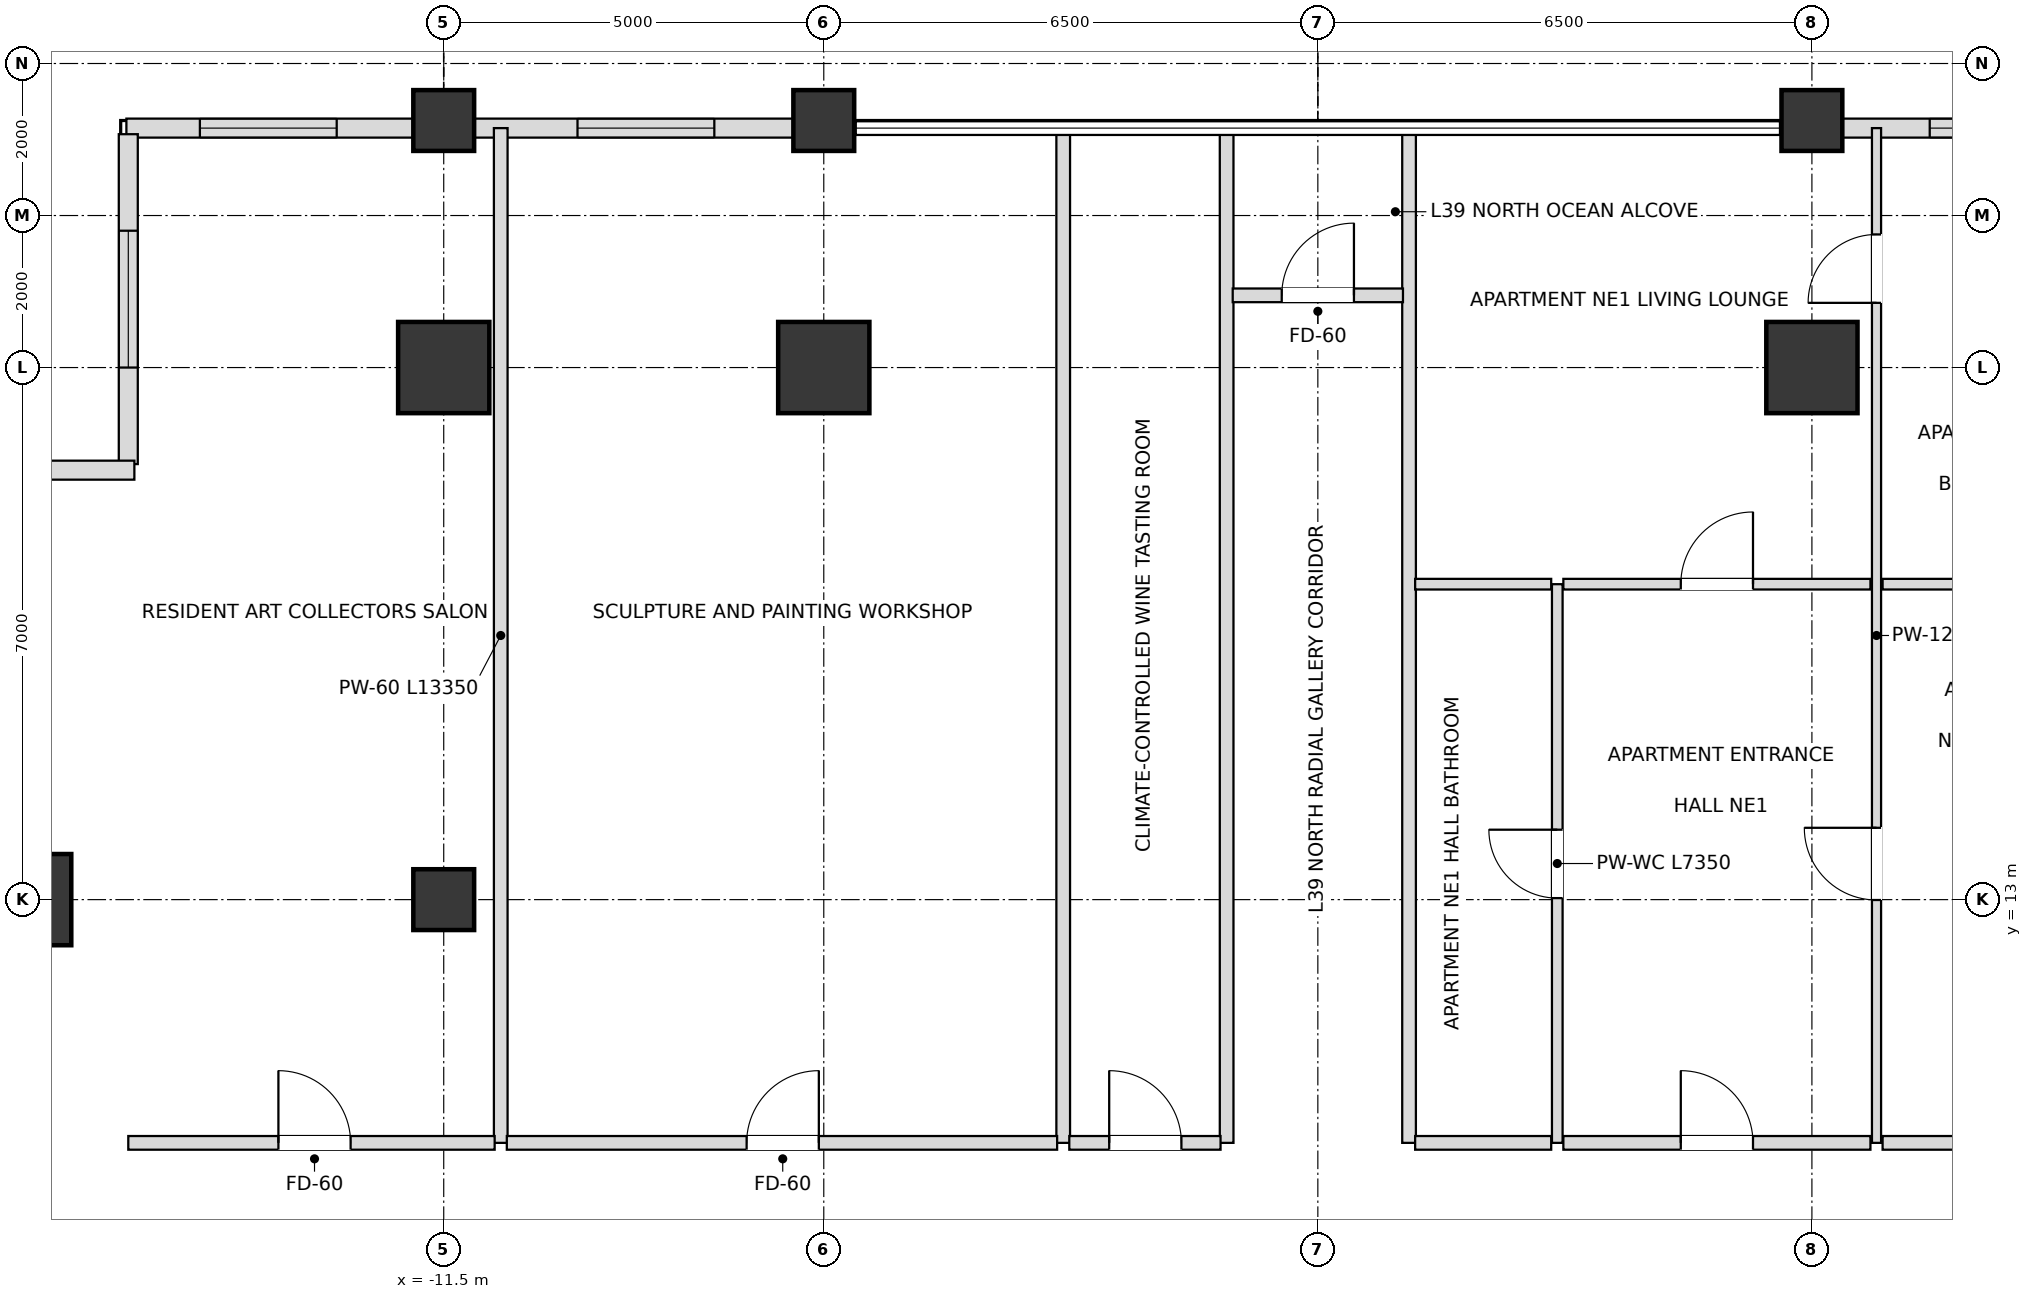
"""IFC4 building model, lengths in metres.
Left out: names, types, materials, properties, quantities, classifications, styles, units other than length and angle.
Written with IfcOpenShell. Run it as: python <this file> out.ifc"""

import sys

from ifc_helpers import new_model, si_unit, direction, frame, frame_2d, origin, origin_2d, place, context, subcontext, project, spatial, rectangle, extrude, element, fill, save


model = new_model("IFC4")
c1 = context("Model", 3, precision=1e-05, world=origin(), true_north=direction((0.0, 1.0)))
c2 = subcontext(c1, "Body", "Model", "MODEL_VIEW")
j1 = project(units=[si_unit("LENGTHUNIT", "METRE"), si_unit("PLANEANGLEUNIT", "RADIAN")], contexts=[c1])
p1 = place(None, origin())
s1 = spatial("IfcSite", under=j1, at=p1, CompositionType="ELEMENT")
p2 = place(p1, origin())
s2 = spatial("IfcBuilding", under=s1, at=p2, CompositionType="ELEMENT")
p3 = place(p2, frame((0.0, 0.0, 154.8)))
s3 = spatial("IfcBuildingStorey", under=s2, at=p3, CompositionType="ELEMENT", Elevation=154.8)
for number, where, z_axis, x_axis in (
    (1, (6.5, 20.0, 0.0), (0.0, 0.0, 1.0), (1.0, 0.0, 0.0)),
    (2, (-6.5, 20.0, 0.0), (0.0, 0.0, 1.0), (1.0, 0.0, 0.0)),
    (3, (-11.5, 20.0, 0.0), (0.0, 0.0, 1.0), (1.0, 0.0, 0.0)),
    (4, (-17.0, 13.0, 0.0), (0.0, 0.0, 1.0), (1.0, 0.0, 0.0)),
):
    element("IfcColumn", number, at=place(p3, frame(where, z_axis=z_axis, x_axis=x_axis)), inside=s3, PredefinedType="USERDEFINED", context=c2, shape_type="SweptSolid", body=[
        extrude(rectangle(XDim=1.2, YDim=1.2, at=origin_2d()), origin(), (0.0, 0.0, 1.0), 3.6),
    ])
for number, where, z_axis, x_axis in (
    (5, (-11.5, 13.0, 0.0), (0.0, 0.0, 1.0), (1.0, 0.0, 0.0)),
    (6, (-11.5, 23.25, 0.0), (0.0, 0.0, 1.0), (1.0, 0.0, 0.0)),
    (7, (-6.5, 23.25, 0.0), (0.0, 0.0, 1.0), (1.0, 0.0, 0.0)),
    (8, (6.5, 23.25, 0.0), (0.0, 0.0, 1.0), (1.0, 0.0, 0.0)),
):
    element("IfcColumn", number, at=place(p3, frame(where, z_axis=z_axis, x_axis=x_axis)), inside=s3, PredefinedType="COLUMN", context=c2, shape_type="SweptSolid", body=[
        extrude(rectangle(XDim=0.8, YDim=0.8, at=origin_2d()), origin(), (0.0, 0.0, 1.0), 3.6),
    ])
p4 = place(p3, frame((11.105, 23.15, 0.0), z_axis=(0.0, 0.0, 1.0), x_axis=(-1.0, 0.0, 0.0)))
e9 = element("IfcWall", 9, at=p4, inside=s3, PredefinedType="SOLIDWALL", context=c2, shape_type="SweptSolid", body=[
    extrude(rectangle(XDim=4.21, YDim=0.25, at=frame_2d((2.105, 0.0))), origin(), (0.0, 0.0, 1.0), 2.736),
])
p5 = place(p4, frame((1.255, 0.0, 0.72)))
e10 = element("IfcOpeningElement", 10, at=p5, cuts=e9, PredefinedType="OPENING", context=c2, shape_type="SweptSolid", body=[
    extrude(rectangle(XDim=1.8, YDim=1.68, at=frame_2d((0.9, 0.84))), frame((0.0, 0.135, 0.0), z_axis=(0.0, -1.0, 0.0), x_axis=(1.0, 0.0, 0.0)), (0.0, 0.0, 1.0), 0.27),
])
p6 = place(p3, frame((-6.895, 23.15, 0.0), z_axis=(0.0, 0.0, 1.0), x_axis=(-1.0, 0.0, 0.0)))
e11 = element("IfcWall", 11, at=p6, inside=s3, PredefinedType="SOLIDWALL", context=c2, shape_type="SweptSolid", body=[
    extrude(rectangle(XDim=4.21, YDim=0.25, at=frame_2d((2.105, 0.0))), origin(), (0.0, 0.0, 1.0), 2.736),
])
p7 = place(p6, frame((1.045, 0.0, 0.72)))
e12 = element("IfcOpeningElement", 12, at=p7, cuts=e11, PredefinedType="OPENING", context=c2, shape_type="SweptSolid", body=[
    extrude(rectangle(XDim=1.8, YDim=1.68, at=frame_2d((0.9, 0.84))), frame((0.0, 0.135, 0.0), z_axis=(0.0, -1.0, 0.0), x_axis=(1.0, 0.0, 0.0)), (0.0, 0.0, 1.0), 0.27),
])
p8 = place(p3, frame((-11.895, 23.15, 0.0), z_axis=(0.0, 0.0, 1.0), x_axis=(-1.0, 0.0, 0.0)))
e13 = element("IfcWall", 13, at=p8, inside=s3, PredefinedType="SOLIDWALL", context=c2, shape_type="SweptSolid", body=[
    extrude(rectangle(XDim=3.78, YDim=0.25, at=frame_2d((1.89, 0.0))), origin(), (0.0, 0.0, 1.0), 2.736),
])
p9 = place(p8, frame((1.013, 0.0, 0.72)))
e14 = element("IfcOpeningElement", 14, at=p9, cuts=e13, PredefinedType="OPENING", context=c2, shape_type="SweptSolid", body=[
    extrude(rectangle(XDim=1.8, YDim=1.68, at=frame_2d((0.9, 0.84))), frame((0.0, 0.135, 0.0), z_axis=(0.0, -1.0, 0.0), x_axis=(1.0, 0.0, 0.0)), (0.0, 0.0, 1.0), 0.27),
])
p10 = place(p3, frame((-15.65, 23.07, 0.0), z_axis=(0.0, 0.0, 1.0), x_axis=(0.0, -1.0, 0.0)))
e15 = element("IfcWall", 15, at=p10, inside=s3, PredefinedType="SOLIDWALL", context=c2, shape_type="SweptSolid", body=[
    extrude(rectangle(XDim=4.34, YDim=0.25, at=frame_2d((2.17, 0.0))), origin(), (0.0, 0.0, 1.0), 2.736),
])
p11 = place(p10, frame((1.27, 0.0, 0.72)))
e16 = element("IfcOpeningElement", 16, at=p11, cuts=e15, PredefinedType="OPENING", context=c2, shape_type="SweptSolid", body=[
    extrude(rectangle(XDim=1.8, YDim=1.68, at=frame_2d((0.9, 0.84))), frame((0.0, 0.135, 0.0), z_axis=(0.0, -1.0, 0.0), x_axis=(1.0, 0.0, 0.0)), (0.0, 0.0, 1.0), 0.27),
])
p12 = place(p3, frame((-15.57, 18.65, 0.0), z_axis=(0.0, 0.0, 1.0), x_axis=(-1.0, 0.0, 0.0)))
e17 = element("IfcWall", 17, at=p12, inside=s3, PredefinedType="SOLIDWALL", context=c2, shape_type="SweptSolid", body=[
    extrude(rectangle(XDim=4.66, YDim=0.25, at=frame_2d((2.33, 0.0))), origin(), (0.0, 0.0, 1.0), 2.736),
])
p13 = place(p12, frame((1.43, 0.0, 0.72)))
e18 = element("IfcOpeningElement", 18, at=p13, cuts=e17, PredefinedType="OPENING", context=c2, shape_type="SweptSolid", body=[
    extrude(rectangle(XDim=1.8, YDim=1.68, at=frame_2d((0.9, 0.84))), frame((0.0, 0.135, 0.0), z_axis=(0.0, -1.0, 0.0), x_axis=(1.0, 0.0, 0.0)), (0.0, 0.0, 1.0), 0.27),
])
for number, where, z_axis, x_axis in (
    (19, (-10.75, 9.8, 0.0), (0.0, 0.0, 1.0), (0.0, 1.0, 0.0)),
    (20, (-3.35, 9.8, 0.0), (0.0, 0.0, 1.0), (0.0, 1.0, 0.0)),
    (21, (-1.2, 9.8, 0.0), (0.0, 0.0, 1.0), (0.0, 1.0, 0.0)),
    (22, (1.2, 9.8, 0.0), (0.0, 0.0, 1.0), (0.0, 1.0, 0.0)),
):
    element("IfcWall", number, at=place(p3, frame(where, z_axis=z_axis, x_axis=x_axis)), inside=s3, PredefinedType="PARTITIONING", context=c2, shape_type="SweptSolid", body=[
        extrude(rectangle(XDim=13.35, YDim=0.18, at=frame_2d((6.675, 0.0))), origin(), (0.0, 0.0, 1.0), 2.816),
    ])
p14 = place(p3, frame((3.15, 9.8, 0.0), z_axis=(0.0, 0.0, 1.0), x_axis=(0.0, 1.0, 0.0)))
e23 = element("IfcWall", 23, at=p14, inside=s3, PredefinedType="PARTITIONING", context=c2, shape_type="SweptSolid", body=[
    extrude(rectangle(XDim=7.35, YDim=0.14, at=frame_2d((3.675, 0.0))), origin(), (0.0, 0.0, 1.0), 3.38),
])
p15 = place(p14, frame((3.22, 0.0, 0.0)))
e24 = element("IfcOpeningElement", 24, at=p15, cuts=e23, PredefinedType="OPENING", context=c2, shape_type="SweptSolid", body=[
    extrude(rectangle(XDim=0.9, YDim=2.1, at=frame_2d((0.45, 1.05))), frame((0.0, 0.08, 0.0), z_axis=(0.0, -1.0, 0.0), x_axis=(1.0, 0.0, 0.0)), (0.0, 0.0, 1.0), 0.16),
])
p16 = place(p3, frame((7.35, 9.8, 0.0), z_axis=(0.0, 0.0, 1.0), x_axis=(0.0, 1.0, 0.0)))
e25 = element("IfcWall", 25, at=p16, inside=s3, PredefinedType="PARTITIONING", context=c2, shape_type="SweptSolid", body=[
    extrude(rectangle(XDim=13.35, YDim=0.12, at=frame_2d((6.675, 0.0))), origin(), (0.0, 0.0, 1.0), 2.816),
])
p17 = place(p16, frame((3.195, 0.0, 0.0)))
e26 = element("IfcOpeningElement", 26, at=p17, cuts=e25, PredefinedType="OPENING", context=c2, shape_type="SweptSolid", body=[
    extrude(rectangle(XDim=0.95, YDim=2.1, at=frame_2d((0.475, 1.05))), frame((0.0, 0.07, 0.0), z_axis=(0.0, -1.0, 0.0), x_axis=(1.0, 0.0, 0.0)), (0.0, 0.0, 1.0), 0.14),
])
p18 = place(p16, frame((11.051, 0.0, 0.0)))
e27 = element("IfcOpeningElement", 27, at=p18, cuts=e25, PredefinedType="OPENING", context=c2, shape_type="SweptSolid", body=[
    extrude(rectangle(XDim=0.9, YDim=2.1, at=frame_2d((0.45, 1.05))), frame((0.0, 0.07, 0.0), z_axis=(0.0, -1.0, 0.0), x_axis=(1.0, 0.0, 0.0)), (0.0, 0.0, 1.0), 0.14),
])
p19 = place(p3, frame((-15.65, 9.8, 0.0), z_axis=(0.0, 0.0, 1.0), x_axis=(1.0, 0.0, 0.0)))
e28 = element("IfcWall", 28, at=p19, inside=s3, PredefinedType="PARTITIONING", context=c2, shape_type="SweptSolid", body=[
    extrude(rectangle(XDim=4.82, YDim=0.18, at=frame_2d((2.41, 0.0))), origin(), (0.0, 0.0, 1.0), 3.38),
])
p20 = place(p19, frame((1.975, 0.0, 0.0)))
e29 = element("IfcOpeningElement", 29, at=p20, cuts=e28, PredefinedType="OPENING", context=c2, shape_type="SweptSolid", body=[
    extrude(rectangle(XDim=0.95, YDim=2.15, at=frame_2d((0.475, 1.075))), frame((0.0, 0.1, 0.0), z_axis=(0.0, -1.0, 0.0), x_axis=(1.0, 0.0, 0.0)), (0.0, 0.0, 1.0), 0.2),
])
p21 = place(p3, frame((-10.67, 9.8, 0.0), z_axis=(0.0, 0.0, 1.0), x_axis=(1.0, 0.0, 0.0)))
e30 = element("IfcWall", 30, at=p21, inside=s3, PredefinedType="PARTITIONING", context=c2, shape_type="SweptSolid", body=[
    extrude(rectangle(XDim=7.24, YDim=0.18, at=frame_2d((3.62, 0.0))), origin(), (0.0, 0.0, 1.0), 2.816),
])
p22 = place(p21, frame((3.155, 0.0, 0.0)))
e31 = element("IfcOpeningElement", 31, at=p22, cuts=e30, PredefinedType="OPENING", context=c2, shape_type="SweptSolid", body=[
    extrude(rectangle(XDim=0.95, YDim=2.15, at=frame_2d((0.475, 1.075))), frame((0.0, 0.1, 0.0), z_axis=(0.0, -1.0, 0.0), x_axis=(1.0, 0.0, 0.0)), (0.0, 0.0, 1.0), 0.2),
])
p23 = place(p3, frame((-3.27, 9.8, 0.0), z_axis=(0.0, 0.0, 1.0), x_axis=(1.0, 0.0, 0.0)))
e32 = element("IfcWall", 32, at=p23, inside=s3, PredefinedType="PARTITIONING", context=c2, shape_type="SweptSolid", body=[
    extrude(rectangle(XDim=1.99, YDim=0.18, at=frame_2d((0.995, 0.0))), origin(), (0.0, 0.0, 1.0), 3.38),
])
p24 = place(p23, frame((0.525, 0.0, 0.0)))
e33 = element("IfcOpeningElement", 33, at=p24, cuts=e32, PredefinedType="OPENING", context=c2, shape_type="SweptSolid", body=[
    extrude(rectangle(XDim=0.95, YDim=2.15, at=frame_2d((0.475, 1.075))), frame((0.0, 0.1, 0.0), z_axis=(0.0, -1.0, 0.0), x_axis=(1.0, 0.0, 0.0)), (0.0, 0.0, 1.0), 0.2),
])
p25 = place(p3, frame((1.28, 9.8, 0.0), z_axis=(0.0, 0.0, 1.0), x_axis=(1.0, 0.0, 0.0)))
e34 = element("IfcWall", 34, at=p25, inside=s3, PredefinedType="PARTITIONING", context=c2, shape_type="SweptSolid", body=[
    extrude(rectangle(XDim=1.79, YDim=0.18, at=frame_2d((0.895, 0.0))), origin(), (0.0, 0.0, 1.0), 3.38),
])
p26 = place(p3, frame((3.23, 9.8, 0.0), z_axis=(0.0, 0.0, 1.0), x_axis=(1.0, 0.0, 0.0)))
e35 = element("IfcWall", 35, at=p26, inside=s3, PredefinedType="PARTITIONING", context=c2, shape_type="SweptSolid", body=[
    extrude(rectangle(XDim=4.04, YDim=0.18, at=frame_2d((2.02, 0.0))), origin(), (0.0, 0.0, 1.0), 2.816),
])
p27 = place(p26, frame((1.545, 0.0, 0.0)))
e36 = element("IfcOpeningElement", 36, at=p27, cuts=e35, PredefinedType="OPENING", context=c2, shape_type="SweptSolid", body=[
    extrude(rectangle(XDim=0.95, YDim=2.15, at=frame_2d((0.475, 1.075))), frame((0.0, 0.1, 0.0), z_axis=(0.0, -1.0, 0.0), x_axis=(1.0, 0.0, 0.0)), (0.0, 0.0, 1.0), 0.2),
])
p28 = place(p3, frame((7.43, 9.8, 0.0), z_axis=(0.0, 0.0, 1.0), x_axis=(1.0, 0.0, 0.0)))
e37 = element("IfcWall", 37, at=p28, inside=s3, PredefinedType="PARTITIONING", context=c2, shape_type="SweptSolid", body=[
    extrude(rectangle(XDim=3.04, YDim=0.18, at=frame_2d((1.52, 0.0))), origin(), (0.0, 0.0, 1.0), 3.38),
])
p29 = place(p3, frame((1.28, 17.15, 0.0), z_axis=(0.0, 0.0, 1.0), x_axis=(1.0, 0.0, 0.0)))
e38 = element("IfcWall", 38, at=p29, inside=s3, PredefinedType="PARTITIONING", context=c2, shape_type="SweptSolid", body=[
    extrude(rectangle(XDim=1.79, YDim=0.14, at=frame_2d((0.895, 0.0))), origin(), (0.0, 0.0, 1.0), 3.38),
])
p30 = place(p3, frame((3.23, 17.15, 0.0), z_axis=(0.0, 0.0, 1.0), x_axis=(1.0, 0.0, 0.0)))
e39 = element("IfcWall", 39, at=p30, inside=s3, PredefinedType="PARTITIONING", context=c2, shape_type="SweptSolid", body=[
    extrude(rectangle(XDim=4.04, YDim=0.14, at=frame_2d((2.02, 0.0))), origin(), (0.0, 0.0, 1.0), 2.816),
])
p31 = place(p30, frame((1.545, 0.0, 0.0)))
e40 = element("IfcOpeningElement", 40, at=p31, cuts=e39, PredefinedType="OPENING", context=c2, shape_type="SweptSolid", body=[
    extrude(rectangle(XDim=0.95, YDim=2.1, at=frame_2d((0.475, 1.05))), frame((0.0, 0.08, 0.0), z_axis=(0.0, -1.0, 0.0), x_axis=(1.0, 0.0, 0.0)), (0.0, 0.0, 1.0), 0.16),
])
p32 = place(p3, frame((7.43, 17.15, 0.0), z_axis=(0.0, 0.0, 1.0), x_axis=(1.0, 0.0, 0.0)))
e41 = element("IfcWall", 41, at=p32, inside=s3, PredefinedType="PARTITIONING", context=c2, shape_type="SweptSolid", body=[
    extrude(rectangle(XDim=3.04, YDim=0.14, at=frame_2d((1.52, 0.0))), origin(), (0.0, 0.0, 1.0), 3.38),
])
p33 = place(p3, frame((-1.12, 20.95, 0.0), z_axis=(0.0, 0.0, 1.0), x_axis=(1.0, 0.0, 0.0)))
e42 = element("IfcWall", 42, at=p33, inside=s3, PredefinedType="PARTITIONING", context=c2, shape_type="SweptSolid", body=[
    extrude(rectangle(XDim=2.24, YDim=0.18, at=frame_2d((1.12, 0.0))), origin(), (0.0, 0.0, 1.0), 3.38),
])
p34 = place(p33, frame((0.645, 0.0, 0.0)))
e43 = element("IfcOpeningElement", 43, at=p34, cuts=e42, PredefinedType="OPENING", context=c2, shape_type="SweptSolid", body=[
    extrude(rectangle(XDim=0.95, YDim=2.15, at=frame_2d((0.475, 1.075))), frame((0.0, 0.1, 0.0), z_axis=(0.0, -1.0, 0.0), x_axis=(1.0, 0.0, 0.0)), (0.0, 0.0, 1.0), 0.2),
])
p35 = place(p5, origin())
e44 = element("IfcWindow", 44, at=p35, inside=s3, PartitioningType="SINGLE_PANEL", PredefinedType="WINDOW", context=c2, shape_type="SweptSolid", body=[
    extrude(rectangle(XDim=1.8, YDim=1.68, at=frame_2d((0.9, 0.84))), frame((0.0, 0.03, 0.0), z_axis=(0.0, -1.0, 0.0), x_axis=(1.0, 0.0, 0.0)), (0.0, 0.0, 1.0), 0.06),
])
fill(e10, e44)
p36 = place(p7, origin())
e45 = element("IfcWindow", 45, at=p36, inside=s3, PartitioningType="SINGLE_PANEL", PredefinedType="WINDOW", context=c2, shape_type="SweptSolid", body=[
    extrude(rectangle(XDim=1.8, YDim=1.68, at=frame_2d((0.9, 0.84))), frame((0.0, 0.03, 0.0), z_axis=(0.0, -1.0, 0.0), x_axis=(1.0, 0.0, 0.0)), (0.0, 0.0, 1.0), 0.06),
])
fill(e12, e45)
p37 = place(p9, origin())
e46 = element("IfcWindow", 46, at=p37, inside=s3, PartitioningType="SINGLE_PANEL", PredefinedType="WINDOW", context=c2, shape_type="SweptSolid", body=[
    extrude(rectangle(XDim=1.8, YDim=1.68, at=frame_2d((0.9, 0.84))), frame((0.0, 0.03, 0.0), z_axis=(0.0, -1.0, 0.0), x_axis=(1.0, 0.0, 0.0)), (0.0, 0.0, 1.0), 0.06),
])
fill(e14, e46)
p38 = place(p11, origin())
e47 = element("IfcWindow", 47, at=p38, inside=s3, PartitioningType="SINGLE_PANEL", PredefinedType="WINDOW", context=c2, shape_type="SweptSolid", body=[
    extrude(rectangle(XDim=1.8, YDim=1.68, at=frame_2d((0.9, 0.84))), frame((0.0, 0.03, 0.0), z_axis=(0.0, -1.0, 0.0), x_axis=(1.0, 0.0, 0.0)), (0.0, 0.0, 1.0), 0.06),
])
fill(e16, e47)
p39 = place(p34, origin())
e48 = element("IfcDoor", 48, at=p39, inside=s3, OperationType="SINGLE_SWING_RIGHT", PredefinedType="DOOR", context=c2, shape_type="SweptSolid", body=[
    extrude(rectangle(XDim=0.95, YDim=2.15, at=frame_2d((0.475, 1.075))), frame((0.0, 0.025, 0.0), z_axis=(0.0, -1.0, 0.0), x_axis=(1.0, 0.0, 0.0)), (0.0, 0.0, 1.0), 0.05),
])
fill(e43, e48)
p40 = place(p20, origin())
e49 = element("IfcDoor", 49, at=p40, inside=s3, OperationType="SINGLE_SWING_LEFT", PredefinedType="DOOR", context=c2, shape_type="SweptSolid", body=[
    extrude(rectangle(XDim=0.95, YDim=2.15, at=frame_2d((0.475, 1.075))), frame((0.0, 0.025, 0.0), z_axis=(0.0, -1.0, 0.0), x_axis=(1.0, 0.0, 0.0)), (0.0, 0.0, 1.0), 0.05),
])
fill(e29, e49)
p41 = place(p22, origin())
e50 = element("IfcDoor", 50, at=p41, inside=s3, OperationType="SINGLE_SWING_RIGHT", PredefinedType="DOOR", context=c2, shape_type="SweptSolid", body=[
    extrude(rectangle(XDim=0.95, YDim=2.15, at=frame_2d((0.475, 1.075))), frame((0.0, 0.025, 0.0), z_axis=(0.0, -1.0, 0.0), x_axis=(1.0, 0.0, 0.0)), (0.0, 0.0, 1.0), 0.05),
])
fill(e31, e50)
p42 = place(p24, origin())
e51 = element("IfcDoor", 51, at=p42, inside=s3, OperationType="SINGLE_SWING_LEFT", PredefinedType="DOOR", context=c2, shape_type="SweptSolid", body=[
    extrude(rectangle(XDim=0.95, YDim=2.15, at=frame_2d((0.475, 1.075))), frame((0.0, 0.025, 0.0), z_axis=(0.0, -1.0, 0.0), x_axis=(1.0, 0.0, 0.0)), (0.0, 0.0, 1.0), 0.05),
])
fill(e33, e51)
p43 = place(p15, origin())
e52 = element("IfcDoor", 52, at=p43, inside=s3, OperationType="SINGLE_SWING_RIGHT", PredefinedType="DOOR", context=c2, shape_type="SweptSolid", body=[
    extrude(rectangle(XDim=0.9, YDim=2.1, at=frame_2d((0.45, 1.05))), frame((0.0, 0.025, 0.0), z_axis=(0.0, -1.0, 0.0), x_axis=(1.0, 0.0, 0.0)), (0.0, 0.0, 1.0), 0.05),
])
fill(e24, e52)
p44 = place(p27, origin())
e53 = element("IfcDoor", 53, at=p44, inside=s3, OperationType="SINGLE_SWING_LEFT", PredefinedType="DOOR", context=c2, shape_type="SweptSolid", body=[
    extrude(rectangle(XDim=0.95, YDim=2.15, at=frame_2d((0.475, 1.075))), frame((0.0, 0.025, 0.0), z_axis=(0.0, -1.0, 0.0), x_axis=(1.0, 0.0, 0.0)), (0.0, 0.0, 1.0), 0.05),
])
fill(e36, e53)
p45 = place(p17, origin())
e54 = element("IfcDoor", 54, at=p45, inside=s3, OperationType="SINGLE_SWING_RIGHT", PredefinedType="DOOR", context=c2, shape_type="SweptSolid", body=[
    extrude(rectangle(XDim=0.95, YDim=2.1, at=frame_2d((0.475, 1.05))), frame((0.0, 0.025, 0.0), z_axis=(0.0, -1.0, 0.0), x_axis=(1.0, 0.0, 0.0)), (0.0, 0.0, 1.0), 0.05),
])
fill(e26, e54)
p46 = place(p31, origin())
e55 = element("IfcDoor", 55, at=p46, inside=s3, OperationType="SINGLE_SWING_RIGHT", PredefinedType="DOOR", context=c2, shape_type="SweptSolid", body=[
    extrude(rectangle(XDim=0.95, YDim=2.1, at=frame_2d((0.475, 1.05))), frame((0.0, 0.025, 0.0), z_axis=(0.0, -1.0, 0.0), x_axis=(1.0, 0.0, 0.0)), (0.0, 0.0, 1.0), 0.05),
])
fill(e40, e55)
p47 = place(p18, origin())
e56 = element("IfcDoor", 56, at=p47, inside=s3, OperationType="SINGLE_SWING_LEFT", PredefinedType="DOOR", context=c2, shape_type="SweptSolid", body=[
    extrude(rectangle(XDim=0.9, YDim=2.1, at=frame_2d((0.45, 1.05))), frame((0.0, 0.025, 0.0), z_axis=(0.0, -1.0, 0.0), x_axis=(1.0, 0.0, 0.0)), (0.0, 0.0, 1.0), 0.05),
])
fill(e27, e56)
save(model, sys.argv[1])
